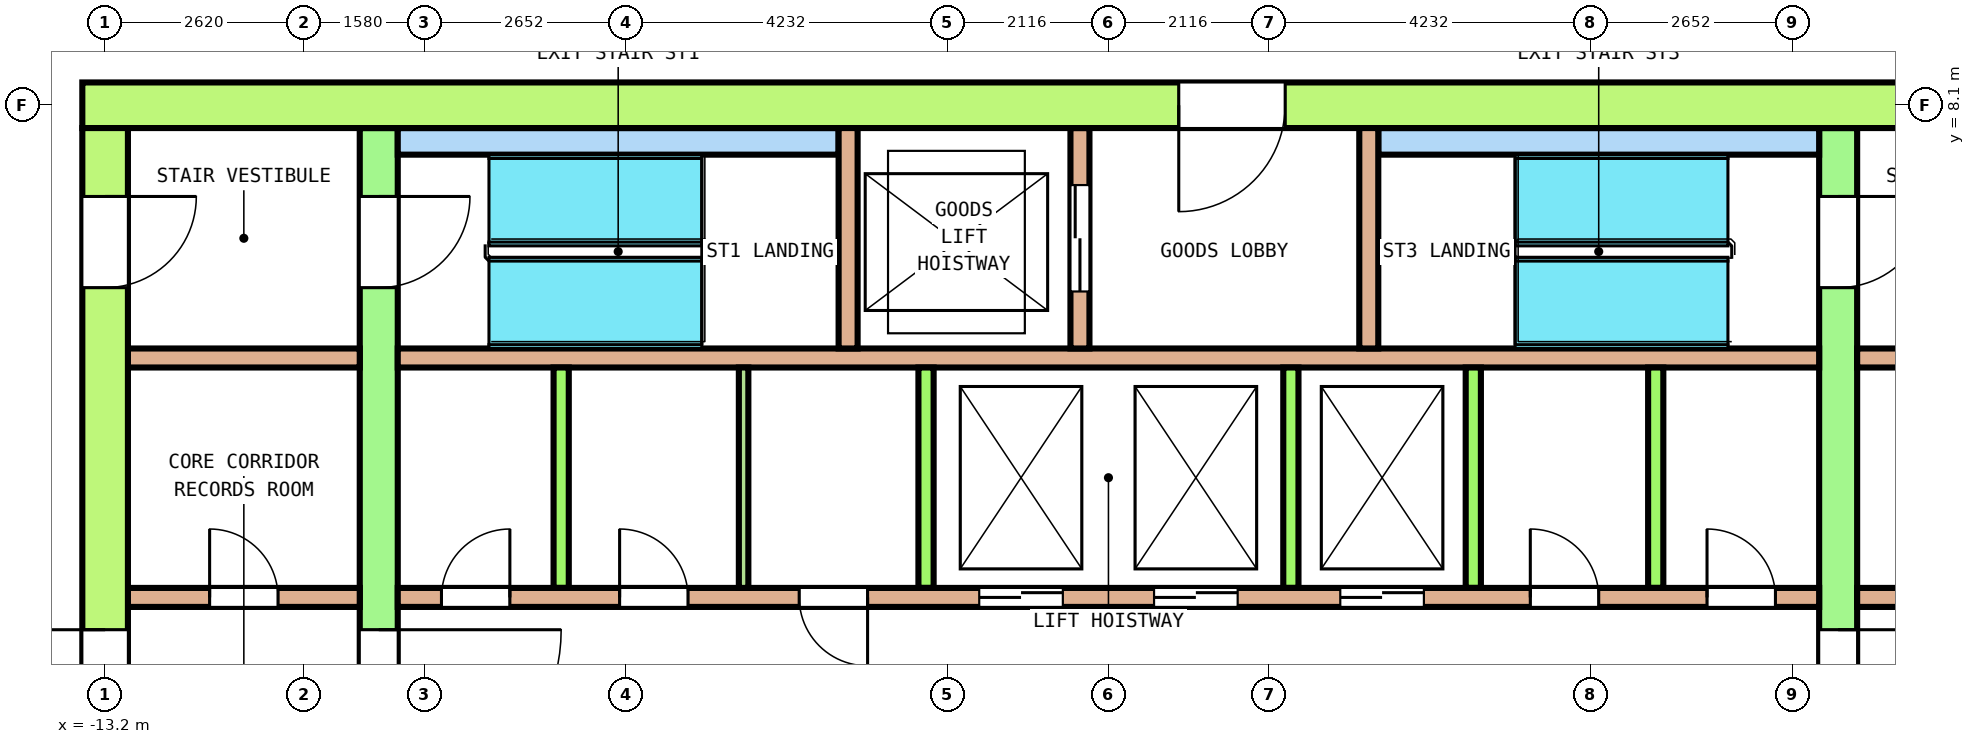
"""IFC4 building model, lengths in metres.
Left out: names, types, materials, properties, quantities, classifications, styles, units other than length and angle.
Written with IfcOpenShell. Run it as: python <this file> out.ifc"""

import sys

from ifc_helpers import new_model, si_unit, direction, frame, frame_2d, origin, place, context, subcontext, project, spatial, rectangle, extrude, element, fill, save


model = new_model("IFC4")
c1 = context("Model", 3, precision=1e-05, world=origin(), true_north=direction((0.0, 1.0)))
c2 = subcontext(c1, "Body", "Model", "MODEL_VIEW")
j1 = project(units=[si_unit("LENGTHUNIT", "METRE"), si_unit("PLANEANGLEUNIT", "RADIAN")], contexts=[c1])
p1 = place(None, origin())
s1 = spatial("IfcSite", under=j1, at=p1, CompositionType="ELEMENT")
p2 = place(p1, origin())
s2 = spatial("IfcBuilding", under=s1, at=p2, CompositionType="ELEMENT")
p3 = place(p2, frame((0.0, 0.0, 237.4)))
s3 = spatial("IfcBuildingStorey", under=s2, at=p3, CompositionType="ELEMENT", Elevation=237.4)
p4 = place(p3, frame((-13.5, 8.1, 0.0), z_axis=(0.0, 0.0, 1.0), x_axis=(1.0, 0.0, 0.0)))
e1 = element("IfcWall", 1, at=p4, inside=s3, PredefinedType="SHEAR", context=c2, shape_type="SweptSolid", body=[
    extrude(rectangle(XDim=27.0, YDim=0.6, at=frame_2d((13.5, 0.0))), origin(), (0.0, 0.0, 1.0), 3.7),
])
p5 = place(p4, frame((14.425, 0.0, 0.0)))
e2 = element("IfcOpeningElement", 2, at=p5, cuts=e1, PredefinedType="OPENING", context=c2, shape_type="SweptSolid", body=[
    extrude(rectangle(XDim=1.4, YDim=2.1, at=frame_2d((0.7, 1.05))), frame((0.0, 0.31, 0.0), z_axis=(0.0, -1.0, 0.0), x_axis=(1.0, 0.0, 0.0)), (0.0, 0.0, 1.0), 0.62),
])
p6 = place(p3, frame((-13.2, -7.8, 0.0), z_axis=(0.0, 0.0, 1.0), x_axis=(0.0, 1.0, 0.0)))
e3 = element("IfcWall", 3, at=p6, inside=s3, PredefinedType="SHEAR", context=c2, shape_type="SweptSolid", body=[
    extrude(rectangle(XDim=15.6, YDim=0.6, at=frame_2d((7.8, 0.0))), origin(), (0.0, 0.0, 1.0), 3.7),
])
p7 = place(p6, frame((6.6, 0.0, 0.0)))
e4 = element("IfcOpeningElement", 4, at=p7, cuts=e3, PredefinedType="OPENING", context=c2, shape_type="SweptSolid", body=[
    extrude(rectangle(XDim=2.4, YDim=2.1, at=frame_2d((1.2, 1.05))), frame((0.0, 0.31, 0.0), z_axis=(0.0, -1.0, 0.0), x_axis=(1.0, 0.0, 0.0)), (0.0, 0.0, 1.0), 0.62),
])
p8 = place(p6, frame((13.5, 0.0, 0.0)))
e5 = element("IfcOpeningElement", 5, at=p8, cuts=e3, PredefinedType="OPENING", context=c2, shape_type="SweptSolid", body=[
    extrude(rectangle(XDim=1.2, YDim=2.1, at=frame_2d((0.6, 1.05))), frame((0.0, 0.31, 0.0), z_axis=(0.0, -1.0, 0.0), x_axis=(1.0, 0.0, 0.0)), (0.0, 0.0, 1.0), 0.62),
])
p9 = place(p6, frame((0.9, 0.0, 0.0)))
e6 = element("IfcOpeningElement", 6, at=p9, cuts=e3, PredefinedType="OPENING", context=c2, shape_type="SweptSolid", body=[
    extrude(rectangle(XDim=1.2, YDim=2.1, at=frame_2d((0.6, 1.05))), frame((0.0, 0.31, 0.0), z_axis=(0.0, -1.0, 0.0), x_axis=(1.0, 0.0, 0.0)), (0.0, 0.0, 1.0), 0.62),
])
p10 = place(p3, frame((-9.6, -7.8, 0.0), z_axis=(0.0, 0.0, 1.0), x_axis=(0.0, 1.0, 0.0)))
e7 = element("IfcWall", 7, at=p10, inside=s3, PredefinedType="SHEAR", context=c2, shape_type="SweptSolid", body=[
    extrude(rectangle(XDim=15.6, YDim=0.5, at=frame_2d((7.8, 0.0))), origin(), (0.0, 0.0, 1.0), 3.7),
])
p11 = place(p10, frame((6.6, 0.0, 0.0)))
e8 = element("IfcOpeningElement", 8, at=p11, cuts=e7, PredefinedType="OPENING", context=c2, shape_type="SweptSolid", body=[
    extrude(rectangle(XDim=2.4, YDim=2.1, at=frame_2d((1.2, 1.05))), frame((0.0, 0.26, 0.0), z_axis=(0.0, -1.0, 0.0), x_axis=(1.0, 0.0, 0.0)), (0.0, 0.0, 1.0), 0.52),
])
p12 = place(p10, frame((13.5, 0.0, 0.0)))
e9 = element("IfcOpeningElement", 9, at=p12, cuts=e7, PredefinedType="OPENING", context=c2, shape_type="SweptSolid", body=[
    extrude(rectangle(XDim=1.2, YDim=2.1, at=frame_2d((0.6, 1.05))), frame((0.0, 0.26, 0.0), z_axis=(0.0, -1.0, 0.0), x_axis=(1.0, 0.0, 0.0)), (0.0, 0.0, 1.0), 0.52),
])
p13 = place(p10, frame((0.9, 0.0, 0.0)))
e10 = element("IfcOpeningElement", 10, at=p13, cuts=e7, PredefinedType="OPENING", context=c2, shape_type="SweptSolid", body=[
    extrude(rectangle(XDim=1.2, YDim=2.1, at=frame_2d((0.6, 1.05))), frame((0.0, 0.26, 0.0), z_axis=(0.0, -1.0, 0.0), x_axis=(1.0, 0.0, 0.0)), (0.0, 0.0, 1.0), 0.52),
])
p14 = place(p3, frame((9.6, -7.8, 0.0), z_axis=(0.0, 0.0, 1.0), x_axis=(0.0, 1.0, 0.0)))
e11 = element("IfcWall", 11, at=p14, inside=s3, PredefinedType="SHEAR", context=c2, shape_type="SweptSolid", body=[
    extrude(rectangle(XDim=15.6, YDim=0.5, at=frame_2d((7.8, 0.0))), origin(), (0.0, 0.0, 1.0), 3.7),
])
p15 = place(p14, frame((6.6, 0.0, 0.0)))
e12 = element("IfcOpeningElement", 12, at=p15, cuts=e11, PredefinedType="OPENING", context=c2, shape_type="SweptSolid", body=[
    extrude(rectangle(XDim=2.4, YDim=2.1, at=frame_2d((1.2, 1.05))), frame((0.0, 0.26, 0.0), z_axis=(0.0, -1.0, 0.0), x_axis=(1.0, 0.0, 0.0)), (0.0, 0.0, 1.0), 0.52),
])
p16 = place(p14, frame((13.5, 0.0, 0.0)))
e13 = element("IfcOpeningElement", 13, at=p16, cuts=e11, PredefinedType="OPENING", context=c2, shape_type="SweptSolid", body=[
    extrude(rectangle(XDim=1.2, YDim=2.1, at=frame_2d((0.6, 1.05))), frame((0.0, 0.26, 0.0), z_axis=(0.0, -1.0, 0.0), x_axis=(1.0, 0.0, 0.0)), (0.0, 0.0, 1.0), 0.52),
])
p17 = place(p14, frame((1.0, 0.0, 0.0)))
e14 = element("IfcOpeningElement", 14, at=p17, cuts=e11, PredefinedType="OPENING", context=c2, shape_type="SweptSolid", body=[
    extrude(rectangle(XDim=1.0, YDim=2.1, at=frame_2d((0.5, 1.05))), frame((0.0, 0.26, 0.0), z_axis=(0.0, -1.0, 0.0), x_axis=(1.0, 0.0, 0.0)), (0.0, 0.0, 1.0), 0.52),
])
p18 = place(p3, frame((-12.9, 1.625, 0.0), z_axis=(0.0, 0.0, 1.0), x_axis=(1.0, 0.0, 0.0)))
e15 = element("IfcWall", 15, at=p18, inside=s3, PredefinedType="SOLIDWALL", context=c2, shape_type="SweptSolid", body=[
    extrude(rectangle(XDim=3.05, YDim=0.25, at=frame_2d((1.525, 0.0))), origin(), (0.0, 0.0, 1.0), 3.7),
])
p19 = place(p18, frame((1.075, 0.0, 0.0)))
e16 = element("IfcOpeningElement", 16, at=p19, cuts=e15, PredefinedType="OPENING", context=c2, shape_type="SweptSolid", body=[
    extrude(rectangle(XDim=0.9, YDim=2.1, at=frame_2d((0.45, 1.05))), frame((0.0, 0.135, 0.0), z_axis=(0.0, -1.0, 0.0), x_axis=(1.0, 0.0, 0.0)), (0.0, 0.0, 1.0), 0.27),
])
p20 = place(p3, frame((-9.35, 1.625, 0.0), z_axis=(0.0, 0.0, 1.0), x_axis=(1.0, 0.0, 0.0)))
e17 = element("IfcWall", 17, at=p20, inside=s3, PredefinedType="SOLIDWALL", context=c2, shape_type="SweptSolid", body=[
    extrude(rectangle(XDim=18.7, YDim=0.25, at=frame_2d((9.35, 0.0))), origin(), (0.0, 0.0, 1.0), 3.7),
])
p21 = place(p20, frame((7.65, 0.0, 0.0)))
e18 = element("IfcOpeningElement", 18, at=p21, cuts=e17, PredefinedType="OPENING", context=c2, shape_type="SweptSolid", body=[
    extrude(rectangle(XDim=1.1, YDim=2.1, at=frame_2d((0.55, 1.05))), frame((0.0, 0.135, 0.0), z_axis=(0.0, -1.0, 0.0), x_axis=(1.0, 0.0, 0.0)), (0.0, 0.0, 1.0), 0.27),
])
p22 = place(p20, frame((9.95, 0.0, 0.0)))
e19 = element("IfcOpeningElement", 19, at=p22, cuts=e17, PredefinedType="OPENING", context=c2, shape_type="SweptSolid", body=[
    extrude(rectangle(XDim=1.1, YDim=2.1, at=frame_2d((0.55, 1.05))), frame((0.0, 0.135, 0.0), z_axis=(0.0, -1.0, 0.0), x_axis=(1.0, 0.0, 0.0)), (0.0, 0.0, 1.0), 0.27),
])
p23 = place(p20, frame((12.4, 0.0, 0.0)))
e20 = element("IfcOpeningElement", 20, at=p23, cuts=e17, PredefinedType="OPENING", context=c2, shape_type="SweptSolid", body=[
    extrude(rectangle(XDim=1.1, YDim=2.1, at=frame_2d((0.55, 1.05))), frame((0.0, 0.135, 0.0), z_axis=(0.0, -1.0, 0.0), x_axis=(1.0, 0.0, 0.0)), (0.0, 0.0, 1.0), 0.27),
])
p24 = place(p20, frame((0.575, 0.0, 0.0)))
e21 = element("IfcOpeningElement", 21, at=p24, cuts=e17, PredefinedType="OPENING", context=c2, shape_type="SweptSolid", body=[
    extrude(rectangle(XDim=0.9, YDim=2.1, at=frame_2d((0.45, 1.05))), frame((0.0, 0.135, 0.0), z_axis=(0.0, -1.0, 0.0), x_axis=(1.0, 0.0, 0.0)), (0.0, 0.0, 1.0), 0.27),
])
p25 = place(p20, frame((2.919, 0.0, 0.0)))
e22 = element("IfcOpeningElement", 22, at=p25, cuts=e17, PredefinedType="OPENING", context=c2, shape_type="SweptSolid", body=[
    extrude(rectangle(XDim=0.9, YDim=2.1, at=frame_2d((0.45, 1.05))), frame((0.0, 0.135, 0.0), z_axis=(0.0, -1.0, 0.0), x_axis=(1.0, 0.0, 0.0)), (0.0, 0.0, 1.0), 0.27),
])
p26 = place(p20, frame((5.281, 0.0, 0.0)))
e23 = element("IfcOpeningElement", 23, at=p26, cuts=e17, PredefinedType="OPENING", context=c2, shape_type="SweptSolid", body=[
    extrude(rectangle(XDim=0.9, YDim=2.1, at=frame_2d((0.45, 1.05))), frame((0.0, 0.135, 0.0), z_axis=(0.0, -1.0, 0.0), x_axis=(1.0, 0.0, 0.0)), (0.0, 0.0, 1.0), 0.27),
])
p27 = place(p20, frame((14.9, 0.0, 0.0)))
e24 = element("IfcOpeningElement", 24, at=p27, cuts=e17, PredefinedType="OPENING", context=c2, shape_type="SweptSolid", body=[
    extrude(rectangle(XDim=0.9, YDim=2.1, at=frame_2d((0.45, 1.05))), frame((0.0, 0.135, 0.0), z_axis=(0.0, -1.0, 0.0), x_axis=(1.0, 0.0, 0.0)), (0.0, 0.0, 1.0), 0.27),
])
p28 = place(p20, frame((17.225, 0.0, 0.0)))
e25 = element("IfcOpeningElement", 25, at=p28, cuts=e17, PredefinedType="OPENING", context=c2, shape_type="SweptSolid", body=[
    extrude(rectangle(XDim=0.9, YDim=2.1, at=frame_2d((0.45, 1.05))), frame((0.0, 0.135, 0.0), z_axis=(0.0, -1.0, 0.0), x_axis=(1.0, 0.0, 0.0)), (0.0, 0.0, 1.0), 0.27),
])
p29 = place(p3, frame((9.85, 1.625, 0.0), z_axis=(0.0, 0.0, 1.0), x_axis=(1.0, 0.0, 0.0)))
e26 = element("IfcWall", 26, at=p29, inside=s3, PredefinedType="SOLIDWALL", context=c2, shape_type="SweptSolid", body=[
    extrude(rectangle(XDim=3.05, YDim=0.25, at=frame_2d((1.525, 0.0))), origin(), (0.0, 0.0, 1.0), 3.7),
])
p30 = place(p29, frame((1.075, 0.0, 0.0)))
e27 = element("IfcOpeningElement", 27, at=p30, cuts=e26, PredefinedType="OPENING", context=c2, shape_type="SweptSolid", body=[
    extrude(rectangle(XDim=0.9, YDim=2.1, at=frame_2d((0.45, 1.05))), frame((0.0, 0.135, 0.0), z_axis=(0.0, -1.0, 0.0), x_axis=(1.0, 0.0, 0.0)), (0.0, 0.0, 1.0), 0.27),
])
p31 = place(p3, frame((-12.9, 4.775, 0.0), z_axis=(0.0, 0.0, 1.0), x_axis=(1.0, 0.0, 0.0)))
e28 = element("IfcWall", 28, at=p31, inside=s3, PredefinedType="SOLIDWALL", context=c2, shape_type="SweptSolid", body=[
    extrude(rectangle(XDim=3.05, YDim=0.25, at=frame_2d((1.525, 0.0))), origin(), (0.0, 0.0, 1.0), 3.7),
])
p32 = place(p3, frame((-9.35, 4.775, 0.0), z_axis=(0.0, 0.0, 1.0), x_axis=(1.0, 0.0, 0.0)))
e29 = element("IfcWall", 29, at=p32, inside=s3, PredefinedType="SOLIDWALL", context=c2, shape_type="SweptSolid", body=[
    extrude(rectangle(XDim=18.7, YDim=0.25, at=frame_2d((9.35, 0.0))), origin(), (0.0, 0.0, 1.0), 3.7),
])
p33 = place(p3, frame((9.85, 4.775, 0.0), z_axis=(0.0, 0.0, 1.0), x_axis=(1.0, 0.0, 0.0)))
e30 = element("IfcWall", 30, at=p33, inside=s3, PredefinedType="SOLIDWALL", context=c2, shape_type="SweptSolid", body=[
    extrude(rectangle(XDim=3.05, YDim=0.25, at=frame_2d((1.525, 0.0))), origin(), (0.0, 0.0, 1.0), 3.7),
])
for number, where, z_axis, x_axis in (
    (31, (-7.2, 1.75, 0.0), (0.0, 0.0, 1.0), (0.0, 1.0, 0.0)),
    (32, (-2.4, 1.75, 0.0), (0.0, 0.0, 1.0), (0.0, 1.0, 0.0)),
    (33, (2.4, 1.75, 0.0), (0.0, 0.0, 1.0), (0.0, 1.0, 0.0)),
    (34, (4.8, 1.75, 0.0), (0.0, 0.0, 1.0), (0.0, 1.0, 0.0)),
    (35, (7.2, 1.75, 0.0), (0.0, 0.0, 1.0), (0.0, 1.0, 0.0)),
):
    element("IfcWall", number, at=place(p3, frame(where, z_axis=z_axis, x_axis=x_axis)), inside=s3, PredefinedType="SOLIDWALL", context=c2, shape_type="SweptSolid", body=[
        extrude(rectangle(XDim=2.9, YDim=0.2, at=frame_2d((1.45, 0.0))), origin(), (0.0, 0.0, 1.0), 3.7),
    ])
for number, where, z_axis, x_axis in (
    (36, (-9.35, 7.625, 0.0), (0.0, 0.0, 1.0), (1.0, 0.0, 0.0)),
    (37, (3.55, 7.625, 0.0), (0.0, 0.0, 1.0), (1.0, 0.0, 0.0)),
):
    element("IfcWall", number, at=place(p3, frame(where, z_axis=z_axis, x_axis=x_axis)), inside=s3, PredefinedType="SOLIDWALL", context=c2, shape_type="SweptSolid", body=[
        extrude(rectangle(XDim=5.8, YDim=0.35, at=frame_2d((2.9, 0.0))), origin(), (0.0, 0.0, 1.0), 3.7),
    ])
p34 = place(p3, frame((-3.425, 4.9, 0.0), z_axis=(0.0, 0.0, 1.0), x_axis=(0.0, 1.0, 0.0)))
e38 = element("IfcWall", 38, at=p34, inside=s3, PredefinedType="SOLIDWALL", context=c2, shape_type="SweptSolid", body=[
    extrude(rectangle(XDim=2.9, YDim=0.25, at=frame_2d((1.45, 0.0))), origin(), (0.0, 0.0, 1.0), 3.7),
])
p35 = place(p3, frame((-0.375, 4.9, 0.0), z_axis=(0.0, 0.0, 1.0), x_axis=(0.0, 1.0, 0.0)))
e39 = element("IfcWall", 39, at=p35, inside=s3, PredefinedType="SOLIDWALL", context=c2, shape_type="SweptSolid", body=[
    extrude(rectangle(XDim=2.9, YDim=0.25, at=frame_2d((1.45, 0.0))), origin(), (0.0, 0.0, 1.0), 3.7),
])
p36 = place(p35, frame((0.75, 0.0, 0.0)))
e40 = element("IfcOpeningElement", 40, at=p36, cuts=e39, PredefinedType="OPENING", context=c2, shape_type="SweptSolid", body=[
    extrude(rectangle(XDim=1.4, YDim=2.1, at=frame_2d((0.7, 1.05))), frame((0.0, 0.135, 0.0), z_axis=(0.0, -1.0, 0.0), x_axis=(1.0, 0.0, 0.0)), (0.0, 0.0, 1.0), 0.27),
])
p37 = place(p3, frame((3.425, 4.9, 0.0), z_axis=(0.0, 0.0, 1.0), x_axis=(0.0, 1.0, 0.0)))
e41 = element("IfcWall", 41, at=p37, inside=s3, PredefinedType="SOLIDWALL", context=c2, shape_type="SweptSolid", body=[
    extrude(rectangle(XDim=2.9, YDim=0.25, at=frame_2d((1.45, 0.0))), origin(), (0.0, 0.0, 1.0), 3.7),
])
p38 = place(p3, frame((-4.8, 1.75, 0.0), z_axis=(0.0, 0.0, 1.0), x_axis=(0.0, 1.0, 0.0)))
e42 = element("IfcWall", 42, at=p38, inside=s3, PredefinedType="PARTITIONING", context=c2, shape_type="SweptSolid", body=[
    extrude(rectangle(XDim=2.9, YDim=0.125, at=frame_2d((1.45, 0.0))), origin(), (0.0, 0.0, 1.0), 3.7),
])
p39 = place(p21, origin())
e43 = element("IfcDoor", 43, at=p39, inside=s3, OperationType="DOUBLE_DOOR_SLIDING", PredefinedType="DOOR", context=c2, shape_type="SweptSolid", body=[
    extrude(rectangle(XDim=1.1, YDim=2.1, at=frame_2d((0.55, 1.05))), frame((0.0, 0.075, 0.0), z_axis=(0.0, -1.0, 0.0), x_axis=(1.0, 0.0, 0.0)), (0.0, 0.0, 1.0), 0.15),
])
fill(e18, e43)
p40 = place(p22, origin())
e44 = element("IfcDoor", 44, at=p40, inside=s3, OperationType="DOUBLE_DOOR_SLIDING", PredefinedType="DOOR", context=c2, shape_type="SweptSolid", body=[
    extrude(rectangle(XDim=1.1, YDim=2.1, at=frame_2d((0.55, 1.05))), frame((0.0, 0.075, 0.0), z_axis=(0.0, -1.0, 0.0), x_axis=(1.0, 0.0, 0.0)), (0.0, 0.0, 1.0), 0.15),
])
fill(e19, e44)
p41 = place(p23, origin())
e45 = element("IfcDoor", 45, at=p41, inside=s3, OperationType="DOUBLE_DOOR_SLIDING", PredefinedType="DOOR", context=c2, shape_type="SweptSolid", body=[
    extrude(rectangle(XDim=1.1, YDim=2.1, at=frame_2d((0.55, 1.05))), frame((0.0, 0.075, 0.0), z_axis=(0.0, -1.0, 0.0), x_axis=(1.0, 0.0, 0.0)), (0.0, 0.0, 1.0), 0.15),
])
fill(e20, e45)
p42 = place(p36, origin())
e46 = element("IfcDoor", 46, at=p42, inside=s3, OperationType="DOUBLE_DOOR_SLIDING", PredefinedType="DOOR", context=c2, shape_type="SweptSolid", body=[
    extrude(rectangle(XDim=1.4, YDim=2.1, at=frame_2d((0.7, 1.05))), frame((0.0, 0.075, 0.0), z_axis=(0.0, -1.0, 0.0), x_axis=(1.0, 0.0, 0.0)), (0.0, 0.0, 1.0), 0.15),
])
fill(e40, e46)
p43 = place(p11, origin())
e47 = element("IfcDoor", 47, at=p43, inside=s3, OperationType="DOUBLE_DOOR_SINGLE_SWING", PredefinedType="DOOR", context=c2, shape_type="SweptSolid", body=[
    extrude(rectangle(XDim=2.4, YDim=2.1, at=frame_2d((1.2, 1.05))), frame((0.0, 0.2, 0.0), z_axis=(0.0, -1.0, 0.0), x_axis=(1.0, 0.0, 0.0)), (0.0, 0.0, 1.0), 0.4),
])
fill(e8, e47)
p44 = place(p15, origin())
e48 = element("IfcDoor", 48, at=p44, inside=s3, OperationType="DOUBLE_DOOR_SINGLE_SWING", PredefinedType="DOOR", context=c2, shape_type="SweptSolid", body=[
    extrude(rectangle(XDim=2.4, YDim=2.1, at=frame_2d((1.2, 1.05))), frame((0.0, 0.2, 0.0), z_axis=(0.0, -1.0, 0.0), x_axis=(1.0, 0.0, 0.0)), (0.0, 0.0, 1.0), 0.4),
])
fill(e12, e48)
p45 = place(p7, origin())
e49 = element("IfcDoor", 49, at=p45, inside=s3, OperationType="DOUBLE_DOOR_SINGLE_SWING", PredefinedType="DOOR", context=c2, shape_type="SweptSolid", body=[
    extrude(rectangle(XDim=2.4, YDim=2.1, at=frame_2d((1.2, 1.05))), frame((0.0, 0.25, 0.0), z_axis=(0.0, -1.0, 0.0), x_axis=(1.0, 0.0, 0.0)), (0.0, 0.0, 1.0), 0.5),
])
fill(e4, e49)
p46 = place(p12, origin())
e50 = element("IfcDoor", 50, at=p46, inside=s3, OperationType="SINGLE_SWING_RIGHT", PredefinedType="DOOR", context=c2, shape_type="SweptSolid", body=[
    extrude(rectangle(XDim=1.2, YDim=2.1, at=frame_2d((0.6, 1.05))), frame((0.0, 0.2, 0.0), z_axis=(0.0, -1.0, 0.0), x_axis=(1.0, 0.0, 0.0)), (0.0, 0.0, 1.0), 0.4),
])
fill(e9, e50)
p47 = place(p8, origin())
e51 = element("IfcDoor", 51, at=p47, inside=s3, OperationType="SINGLE_SWING_LEFT", PredefinedType="DOOR", context=c2, shape_type="SweptSolid", body=[
    extrude(rectangle(XDim=1.2, YDim=2.1, at=frame_2d((0.6, 1.05))), frame((0.0, 0.25, 0.0), z_axis=(0.0, -1.0, 0.0), x_axis=(1.0, 0.0, 0.0)), (0.0, 0.0, 1.0), 0.5),
])
fill(e5, e51)
p48 = place(p16, origin())
e52 = element("IfcDoor", 52, at=p48, inside=s3, OperationType="SINGLE_SWING_RIGHT", PredefinedType="DOOR", context=c2, shape_type="SweptSolid", body=[
    extrude(rectangle(XDim=1.2, YDim=2.1, at=frame_2d((0.6, 1.05))), frame((0.0, 0.2, 0.0), z_axis=(0.0, -1.0, 0.0), x_axis=(1.0, 0.0, 0.0)), (0.0, 0.0, 1.0), 0.4),
])
fill(e13, e52)
p49 = place(p5, origin())
e53 = element("IfcDoor", 53, at=p49, inside=s3, OperationType="DOUBLE_DOOR_SINGLE_SWING", PredefinedType="DOOR", context=c2, shape_type="SweptSolid", body=[
    extrude(rectangle(XDim=1.4, YDim=2.1, at=frame_2d((0.7, 1.05))), frame((0.0, 0.25, 0.0), z_axis=(0.0, -1.0, 0.0), x_axis=(1.0, 0.0, 0.0)), (0.0, 0.0, 1.0), 0.5),
])
fill(e2, e53)
p50 = place(p19, origin())
e54 = element("IfcDoor", 54, at=p50, inside=s3, OperationType="SINGLE_SWING_RIGHT", PredefinedType="DOOR", context=c2, shape_type="SweptSolid", body=[
    extrude(rectangle(XDim=0.9, YDim=2.1, at=frame_2d((0.45, 1.05))), frame((0.0, 0.075, 0.0), z_axis=(0.0, -1.0, 0.0), x_axis=(1.0, 0.0, 0.0)), (0.0, 0.0, 1.0), 0.15),
])
fill(e16, e54)
p51 = place(p24, origin())
e55 = element("IfcDoor", 55, at=p51, inside=s3, OperationType="SINGLE_SWING_LEFT", PredefinedType="DOOR", context=c2, shape_type="SweptSolid", body=[
    extrude(rectangle(XDim=0.9, YDim=2.1, at=frame_2d((0.45, 1.05))), frame((0.0, 0.075, 0.0), z_axis=(0.0, -1.0, 0.0), x_axis=(1.0, 0.0, 0.0)), (0.0, 0.0, 1.0), 0.15),
])
fill(e21, e55)
p52 = place(p25, origin())
e56 = element("IfcDoor", 56, at=p52, inside=s3, OperationType="SINGLE_SWING_RIGHT", PredefinedType="DOOR", context=c2, shape_type="SweptSolid", body=[
    extrude(rectangle(XDim=0.9, YDim=2.1, at=frame_2d((0.45, 1.05))), frame((0.0, 0.075, 0.0), z_axis=(0.0, -1.0, 0.0), x_axis=(1.0, 0.0, 0.0)), (0.0, 0.0, 1.0), 0.15),
])
fill(e22, e56)
p53 = place(p26, origin())
e57 = element("IfcDoor", 57, at=p53, inside=s3, OperationType="SINGLE_SWING_LEFT", PredefinedType="DOOR", context=c2, shape_type="SweptSolid", body=[
    extrude(rectangle(XDim=0.9, YDim=2.1, at=frame_2d((0.45, 1.05))), frame((0.0, 0.075, 0.0), z_axis=(0.0, -1.0, 0.0), x_axis=(1.0, 0.0, 0.0)), (0.0, 0.0, 1.0), 0.15),
])
fill(e23, e57)
p54 = place(p27, origin())
e58 = element("IfcDoor", 58, at=p54, inside=s3, OperationType="SINGLE_SWING_RIGHT", PredefinedType="DOOR", context=c2, shape_type="SweptSolid", body=[
    extrude(rectangle(XDim=0.9, YDim=2.1, at=frame_2d((0.45, 1.05))), frame((0.0, 0.075, 0.0), z_axis=(0.0, -1.0, 0.0), x_axis=(1.0, 0.0, 0.0)), (0.0, 0.0, 1.0), 0.15),
])
fill(e24, e58)
p55 = place(p28, origin())
e59 = element("IfcDoor", 59, at=p55, inside=s3, OperationType="SINGLE_SWING_LEFT", PredefinedType="DOOR", context=c2, shape_type="SweptSolid", body=[
    extrude(rectangle(XDim=0.9, YDim=2.1, at=frame_2d((0.45, 1.05))), frame((0.0, 0.075, 0.0), z_axis=(0.0, -1.0, 0.0), x_axis=(1.0, 0.0, 0.0)), (0.0, 0.0, 1.0), 0.15),
])
fill(e25, e59)
save(model, sys.argv[1])
